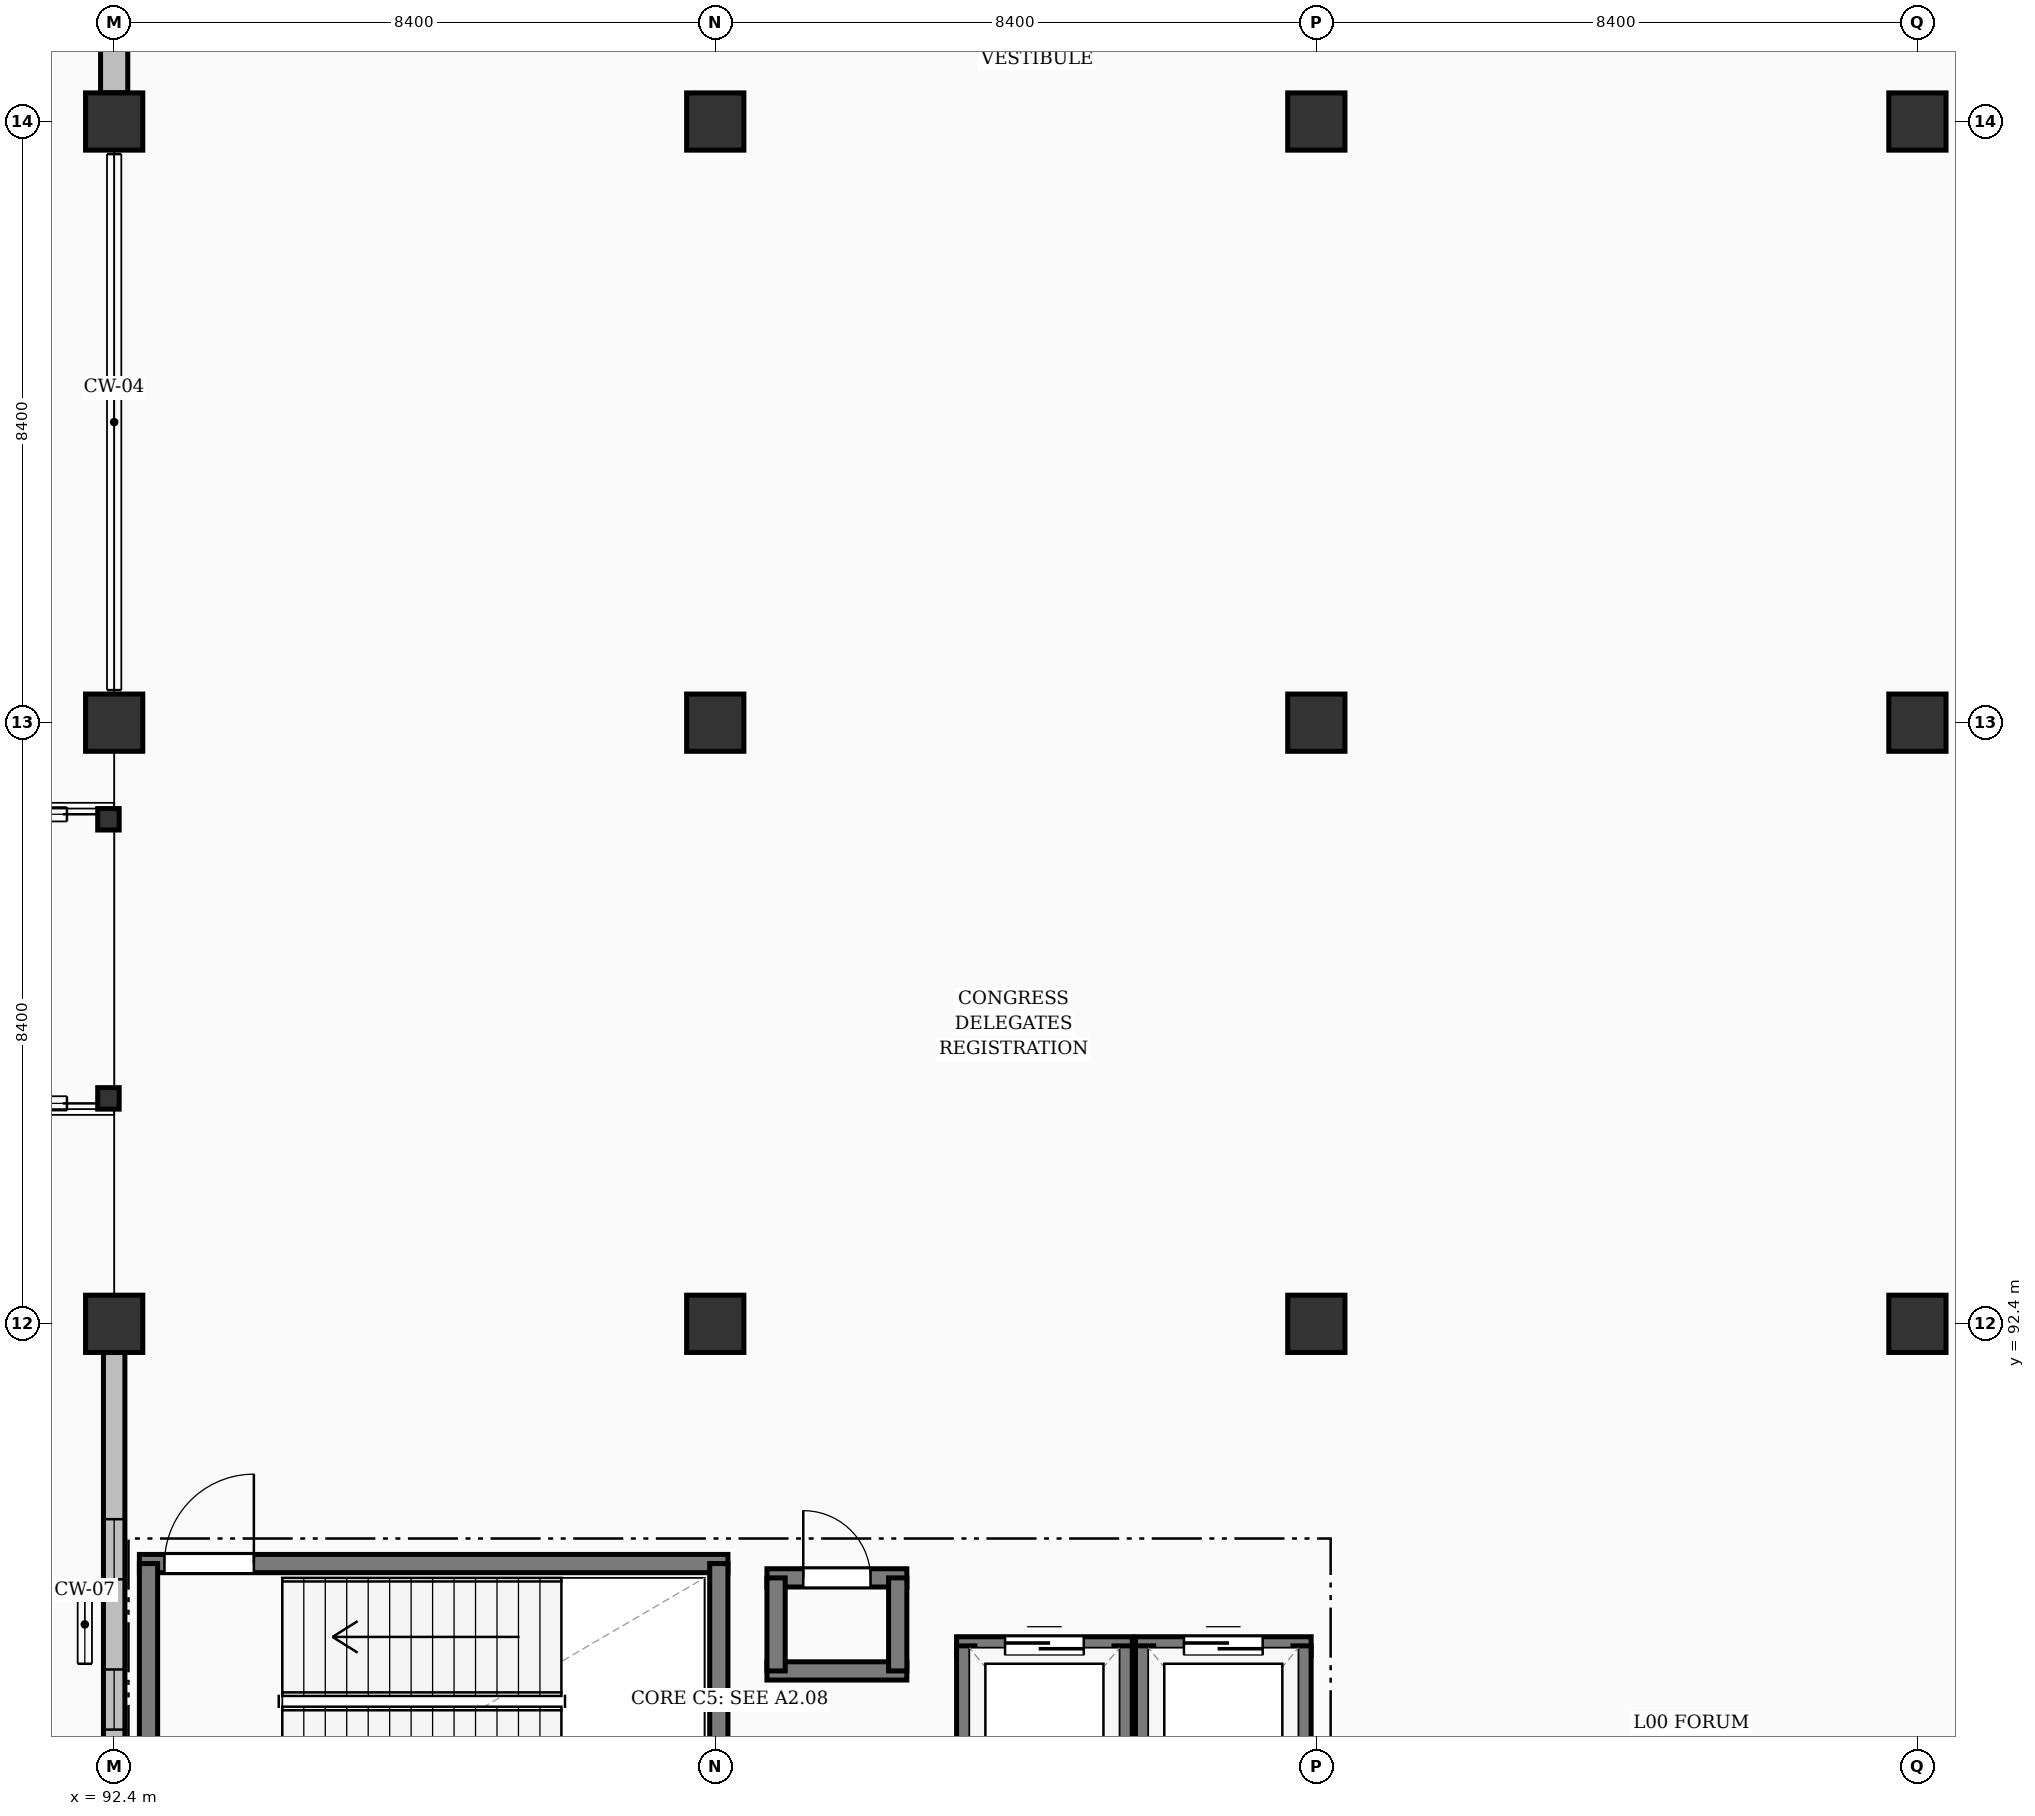
"""IFC4 building model, lengths in metres.
Left out: names, types, materials, properties, quantities, classifications, styles, units other than length and angle.
Written with IfcOpenShell. Run it as: python <this file> out.ifc"""

import sys

from ifc_helpers import new_model, si_unit, direction, frame, frame_2d, origin, origin_2d, place, context, subcontext, project, spatial, rectangle, hollow_rectangle, extrude, element, fill, save


model = new_model("IFC4")
c1 = context("Model", 3, precision=1e-05, world=origin(), true_north=direction((0.0, 1.0)))
c2 = subcontext(c1, "Body", "Model", "MODEL_VIEW")
j1 = project(units=[si_unit("LENGTHUNIT", "METRE"), si_unit("PLANEANGLEUNIT", "RADIAN")], contexts=[c1])
p1 = place(None, origin())
s1 = spatial("IfcSite", under=j1, at=p1, CompositionType="ELEMENT")
p2 = place(p1, origin())
s2 = spatial("IfcBuilding", under=s1, at=p2, CompositionType="ELEMENT")
p3 = place(p2, origin())
s3 = spatial("IfcBuildingStorey", under=s2, at=p3, CompositionType="ELEMENT", Elevation=0.0)
for number, where, z_axis, x_axis in (
    (1, (92.4, 92.4, 0.0), (0.0, 0.0, 1.0), (1.0, 0.0, 0.0)),
    (2, (92.4, 100.8, 0.0), (0.0, 0.0, 1.0), (1.0, 0.0, 0.0)),
    (3, (92.4, 109.2, 0.0), (0.0, 0.0, 1.0), (1.0, 0.0, 0.0)),
    (4, (100.8, 92.4, 0.0), (0.0, 0.0, 1.0), (1.0, 0.0, 0.0)),
    (5, (100.8, 100.8, 0.0), (0.0, 0.0, 1.0), (1.0, 0.0, 0.0)),
    (6, (100.8, 109.2, 0.0), (0.0, 0.0, 1.0), (1.0, 0.0, 0.0)),
    (7, (109.2, 92.4, 0.0), (0.0, 0.0, 1.0), (1.0, 0.0, 0.0)),
    (8, (109.2, 100.8, 0.0), (0.0, 0.0, 1.0), (1.0, 0.0, 0.0)),
    (9, (109.2, 109.2, 0.0), (0.0, 0.0, 1.0), (1.0, 0.0, 0.0)),
    (10, (117.6, 92.4, 0.0), (0.0, 0.0, 1.0), (1.0, 0.0, 0.0)),
    (11, (117.6, 100.8, 0.0), (0.0, 0.0, 1.0), (1.0, 0.0, 0.0)),
    (12, (117.6, 109.2, 0.0), (0.0, 0.0, 1.0), (1.0, 0.0, 0.0)),
):
    element("IfcColumn", number, at=place(p3, frame(where, z_axis=z_axis, x_axis=x_axis)), inside=s3, PredefinedType="COLUMN", context=c2, shape_type="SweptSolid", body=[
        extrude(rectangle(XDim=0.8, YDim=0.8, at=origin_2d()), origin(), (0.0, 0.0, 1.0), 3.92),
    ])
for number, where, z_axis, x_axis in (
    (13, (92.32, 95.55, 0.0), (0.0, 0.0, 1.0), (1.0, 0.0, 0.0)),
    (14, (92.32, 99.45, 0.0), (0.0, 0.0, 1.0), (1.0, 0.0, 0.0)),
):
    element("IfcColumn", number, at=place(p3, frame(where, z_axis=z_axis, x_axis=x_axis)), inside=s3, PredefinedType="COLUMN", context=c2, shape_type="SweptSolid", body=[
        extrude(hollow_rectangle(XDim=0.3, YDim=0.3, WallThickness=0.016, at=origin_2d()), origin(), (0.0, 0.0, 1.0), 3.92),
    ])
p4 = place(p3, frame((92.4, 84.401, 0.0), z_axis=(0.0, 0.0, 1.0), x_axis=(0.0, 1.0, 0.0)))
e15 = element("IfcWall", 15, at=p4, inside=s3, PredefinedType="SOLIDWALL", context=c2, shape_type="SweptSolid", body=[
    extrude(rectangle(XDim=7.598, YDim=0.3, at=frame_2d((3.799, 0.0))), origin(), (0.0, 0.0, 1.0), 2.775),
])
p5 = place(p4, frame((2.329, 0.0, 0.3)))
e16 = element("IfcOpeningElement", 16, at=p5, cuts=e15, PredefinedType="OPENING", context=c2, shape_type="SweptSolid", body=[
    extrude(rectangle(XDim=0.84, YDim=1.85, at=frame_2d((0.42, 0.925))), frame((0.0, 0.16, 0.0), z_axis=(0.0, -1.0, 0.0), x_axis=(1.0, 0.0, 0.0)), (0.0, 0.0, 1.0), 0.32),
])
p6 = place(p4, frame((4.429, 0.0, 0.3)))
e17 = element("IfcOpeningElement", 17, at=p6, cuts=e15, PredefinedType="OPENING", context=c2, shape_type="SweptSolid", body=[
    extrude(rectangle(XDim=0.84, YDim=1.85, at=frame_2d((0.42, 0.925))), frame((0.0, 0.16, 0.0), z_axis=(0.0, -1.0, 0.0), x_axis=(1.0, 0.0, 0.0)), (0.0, 0.0, 1.0), 0.32),
])
p7 = place(p3, frame((92.4, 109.601, 0.0), z_axis=(0.0, 0.0, 1.0), x_axis=(0.0, 1.0, 0.0)))
e18 = element("IfcWall", 18, at=p7, inside=s3, PredefinedType="SOLIDWALL", context=c2, shape_type="SweptSolid", body=[
    extrude(rectangle(XDim=7.598, YDim=0.38, at=frame_2d((3.799, 0.0))), origin(), (0.0, 0.0, 1.0), 2.975),
])
p8 = place(p7, frame((2.299, 0.0, 0.3)))
e19 = element("IfcOpeningElement", 19, at=p8, cuts=e18, PredefinedType="OPENING", context=c2, shape_type="SweptSolid", body=[
    extrude(rectangle(XDim=0.9, YDim=1.95, at=frame_2d((0.45, 0.975))), frame((0.0, 0.2, 0.0), z_axis=(0.0, -1.0, 0.0), x_axis=(1.0, 0.0, 0.0)), (0.0, 0.0, 1.0), 0.4),
])
p9 = place(p7, frame((4.399, 0.0, 0.3)))
e20 = element("IfcOpeningElement", 20, at=p9, cuts=e18, PredefinedType="OPENING", context=c2, shape_type="SweptSolid", body=[
    extrude(rectangle(XDim=0.9, YDim=1.95, at=frame_2d((0.45, 0.975))), frame((0.0, 0.2, 0.0), z_axis=(0.0, -1.0, 0.0), x_axis=(1.0, 0.0, 0.0)), (0.0, 0.0, 1.0), 0.4),
])
p10 = place(p3, frame((92.752, 89.05, 0.0), z_axis=(0.0, 0.0, 1.0), x_axis=(1.0, 0.0, 0.0)))
e21 = element("IfcWall", 21, at=p10, inside=s3, PredefinedType="SOLIDWALL", context=c2, shape_type="SweptSolid", body=[
    extrude(rectangle(XDim=8.225, YDim=0.255, at=frame_2d((4.113, 0.0))), origin(), (0.0, 0.0, 1.0), 3.64),
])
p11 = place(p10, frame((0.35, 0.0, 0.0)))
e22 = element("IfcOpeningElement", 22, at=p11, cuts=e21, PredefinedType="OPENING", context=c2, shape_type="SweptSolid", body=[
    extrude(rectangle(XDim=1.25, YDim=2.2, at=frame_2d((0.625, 1.1))), frame((0.0, 0.137, 0.0), z_axis=(0.0, -1.0, 0.0), x_axis=(1.0, 0.0, 0.0)), (0.0, 0.0, 1.0), 0.275),
])
for number, where, z_axis, x_axis in (
    (23, (92.88, 85.18, 0.0), (0.0, 0.0, 1.0), (0.0, 1.0, 0.0)),
    (24, (100.85, 85.18, 0.0), (0.0, 0.0, 1.0), (0.0, 1.0, 0.0)),
):
    element("IfcWall", number, at=place(p3, frame(where, z_axis=z_axis, x_axis=x_axis)), inside=s3, PredefinedType="SOLIDWALL", context=c2, shape_type="SweptSolid", body=[
        extrude(rectangle(XDim=3.87, YDim=0.255, at=frame_2d((1.935, 0.0))), origin(), (0.0, 0.0, 1.0), 3.64),
    ])
p12 = place(p3, frame((104.173, 87.9, 0.0), z_axis=(0.0, 0.0, 1.0), x_axis=(1.0, 0.0, 0.0)))
e25 = element("IfcWall", 25, at=p12, inside=s3, PredefinedType="SOLIDWALL", context=c2, shape_type="SweptSolid", body=[
    extrude(rectangle(XDim=2.455, YDim=0.255, at=frame_2d((1.228, 0.0))), origin(), (0.0, 0.0, 1.0), 3.64),
])
p13 = place(p12, frame((0.677, 0.0, 0.0)))
e26 = element("IfcOpeningElement", 26, at=p13, cuts=e25, PredefinedType="OPENING", context=c2, shape_type="SweptSolid", body=[
    extrude(rectangle(XDim=1.1, YDim=2.15, at=frame_2d((0.55, 1.075))), frame((0.0, 0.137, 0.0), z_axis=(0.0, -1.0, 0.0), x_axis=(1.0, 0.0, 0.0)), (0.0, 0.0, 1.0), 0.275),
])
for number, where, z_axis, x_axis in (
    (27, (104.3, 85.3, 0.0), (0.0, 0.0, 1.0), (0.0, 1.0, 0.0)),
    (28, (106.5, 85.3, 0.0), (0.0, 0.0, 1.0), (0.0, 1.0, 0.0)),
):
    element("IfcWall", number, at=place(p3, frame(where, z_axis=z_axis, x_axis=x_axis)), inside=s3, PredefinedType="SOLIDWALL", context=c2, shape_type="SweptSolid", body=[
        extrude(rectangle(XDim=2.6, YDim=0.255, at=frame_2d((1.3, 0.0))), origin(), (0.0, 0.0, 1.0), 3.64),
    ])
p14 = place(p3, frame((106.673, 87.9, 0.0), z_axis=(0.0, 0.0, 1.0), x_axis=(1.0, 0.0, 0.0)))
e29 = element("IfcWall", 29, at=p14, inside=s3, PredefinedType="SOLIDWALL", context=c2, shape_type="SweptSolid", body=[
    extrude(rectangle(XDim=2.455, YDim=0.255, at=frame_2d((1.228, 0.0))), origin(), (0.0, 0.0, 1.0), 3.64),
])
p15 = place(p14, frame((0.677, 0.0, 0.0)))
e30 = element("IfcOpeningElement", 30, at=p15, cuts=e29, PredefinedType="OPENING", context=c2, shape_type="SweptSolid", body=[
    extrude(rectangle(XDim=1.1, YDim=2.15, at=frame_2d((0.55, 1.075))), frame((0.0, 0.137, 0.0), z_axis=(0.0, -1.0, 0.0), x_axis=(1.0, 0.0, 0.0)), (0.0, 0.0, 1.0), 0.275),
])
for number, where, z_axis, x_axis in (
    (31, (106.8, 85.3, 0.0), (0.0, 0.0, 1.0), (0.0, 1.0, 0.0)),
    (32, (109.0, 85.3, 0.0), (0.0, 0.0, 1.0), (0.0, 1.0, 0.0)),
):
    element("IfcWall", number, at=place(p3, frame(where, z_axis=z_axis, x_axis=x_axis)), inside=s3, PredefinedType="SOLIDWALL", context=c2, shape_type="SweptSolid", body=[
        extrude(rectangle(XDim=2.6, YDim=0.255, at=frame_2d((1.3, 0.0))), origin(), (0.0, 0.0, 1.0), 3.64),
    ])
p16 = place(p3, frame((101.522, 87.55, 0.0), z_axis=(0.0, 0.0, 1.0), x_axis=(1.0, 0.0, 0.0)))
e33 = element("IfcWall", 33, at=p16, inside=s3, PredefinedType="SOLIDWALL", context=c2, shape_type="SweptSolid", body=[
    extrude(rectangle(XDim=1.955, YDim=0.255, at=frame_2d((0.978, 0.0))), origin(), (0.0, 0.0, 1.0), 3.64),
])
p17 = place(p3, frame((101.522, 88.85, 0.0), z_axis=(0.0, 0.0, 1.0), x_axis=(1.0, 0.0, 0.0)))
e34 = element("IfcWall", 34, at=p17, inside=s3, PredefinedType="SOLIDWALL", context=c2, shape_type="SweptSolid", body=[
    extrude(rectangle(XDim=1.955, YDim=0.255, at=frame_2d((0.978, 0.0))), origin(), (0.0, 0.0, 1.0), 3.64),
])
p18 = place(p17, frame((0.508, 0.0, 0.0)))
e35 = element("IfcOpeningElement", 35, at=p18, cuts=e34, PredefinedType="OPENING", context=c2, shape_type="SweptSolid", body=[
    extrude(rectangle(XDim=0.94, YDim=2.1, at=frame_2d((0.47, 1.05))), frame((0.0, 0.137, 0.0), z_axis=(0.0, -1.0, 0.0), x_axis=(1.0, 0.0, 0.0)), (0.0, 0.0, 1.0), 0.275),
])
for number, where, z_axis, x_axis in (
    (36, (101.65, 87.55, 0.0), (0.0, 0.0, 1.0), (0.0, 1.0, 0.0)),
    (37, (103.35, 87.55, 0.0), (0.0, 0.0, 1.0), (0.0, 1.0, 0.0)),
):
    element("IfcWall", number, at=place(p3, frame(where, z_axis=z_axis, x_axis=x_axis)), inside=s3, PredefinedType="SOLIDWALL", context=c2, shape_type="SweptSolid", body=[
        extrude(rectangle(XDim=1.3, YDim=0.255, at=frame_2d((0.65, 0.0))), origin(), (0.0, 0.0, 1.0), 3.64),
    ])
p19 = place(p5, origin())
e38 = element("IfcWindow", 38, at=p19, inside=s3, PartitioningType="SINGLE_PANEL", PredefinedType="WINDOW", context=c2, shape_type="SweptSolid", body=[
    extrude(rectangle(XDim=0.84, YDim=1.85, at=frame_2d((0.42, 0.925))), frame((0.0, 0.03, 0.0), z_axis=(0.0, -1.0, 0.0), x_axis=(1.0, 0.0, 0.0)), (0.0, 0.0, 1.0), 0.06),
])
fill(e16, e38)
p20 = place(p6, origin())
e39 = element("IfcWindow", 39, at=p20, inside=s3, PartitioningType="SINGLE_PANEL", PredefinedType="WINDOW", context=c2, shape_type="SweptSolid", body=[
    extrude(rectangle(XDim=0.84, YDim=1.85, at=frame_2d((0.42, 0.925))), frame((0.0, 0.03, 0.0), z_axis=(0.0, -1.0, 0.0), x_axis=(1.0, 0.0, 0.0)), (0.0, 0.0, 1.0), 0.06),
])
fill(e17, e39)
p21 = place(p11, origin())
e40 = element("IfcDoor", 40, at=p21, inside=s3, OperationType="SINGLE_SWING_RIGHT", PredefinedType="DOOR", context=c2, shape_type="SweptSolid", body=[
    extrude(rectangle(XDim=1.25, YDim=2.2, at=frame_2d((0.625, 1.1))), frame((0.0, 0.025, 0.0), z_axis=(0.0, -1.0, 0.0), x_axis=(1.0, 0.0, 0.0)), (0.0, 0.0, 1.0), 0.05),
])
fill(e22, e40)
p22 = place(p13, origin())
e41 = element("IfcDoor", 41, at=p22, inside=s3, OperationType="DOUBLE_DOOR_SLIDING", PredefinedType="DOOR", context=c2, shape_type="SweptSolid", body=[
    extrude(rectangle(XDim=1.1, YDim=2.15, at=frame_2d((0.55, 1.075))), frame((0.0, 0.025, 0.0), z_axis=(0.0, -1.0, 0.0), x_axis=(1.0, 0.0, 0.0)), (0.0, 0.0, 1.0), 0.05),
])
fill(e26, e41)
p23 = place(p15, origin())
e42 = element("IfcDoor", 42, at=p23, inside=s3, OperationType="DOUBLE_DOOR_SLIDING", PredefinedType="DOOR", context=c2, shape_type="SweptSolid", body=[
    extrude(rectangle(XDim=1.1, YDim=2.15, at=frame_2d((0.55, 1.075))), frame((0.0, 0.025, 0.0), z_axis=(0.0, -1.0, 0.0), x_axis=(1.0, 0.0, 0.0)), (0.0, 0.0, 1.0), 0.05),
])
fill(e30, e42)
p24 = place(p18, origin())
e43 = element("IfcDoor", 43, at=p24, inside=s3, OperationType="SINGLE_SWING_LEFT", PredefinedType="DOOR", context=c2, shape_type="SweptSolid", body=[
    extrude(rectangle(XDim=0.94, YDim=2.1, at=frame_2d((0.47, 1.05))), frame((0.0, 0.025, 0.0), z_axis=(0.0, -1.0, 0.0), x_axis=(1.0, 0.0, 0.0)), (0.0, 0.0, 1.0), 0.05),
])
fill(e35, e43)
save(model, sys.argv[1])
